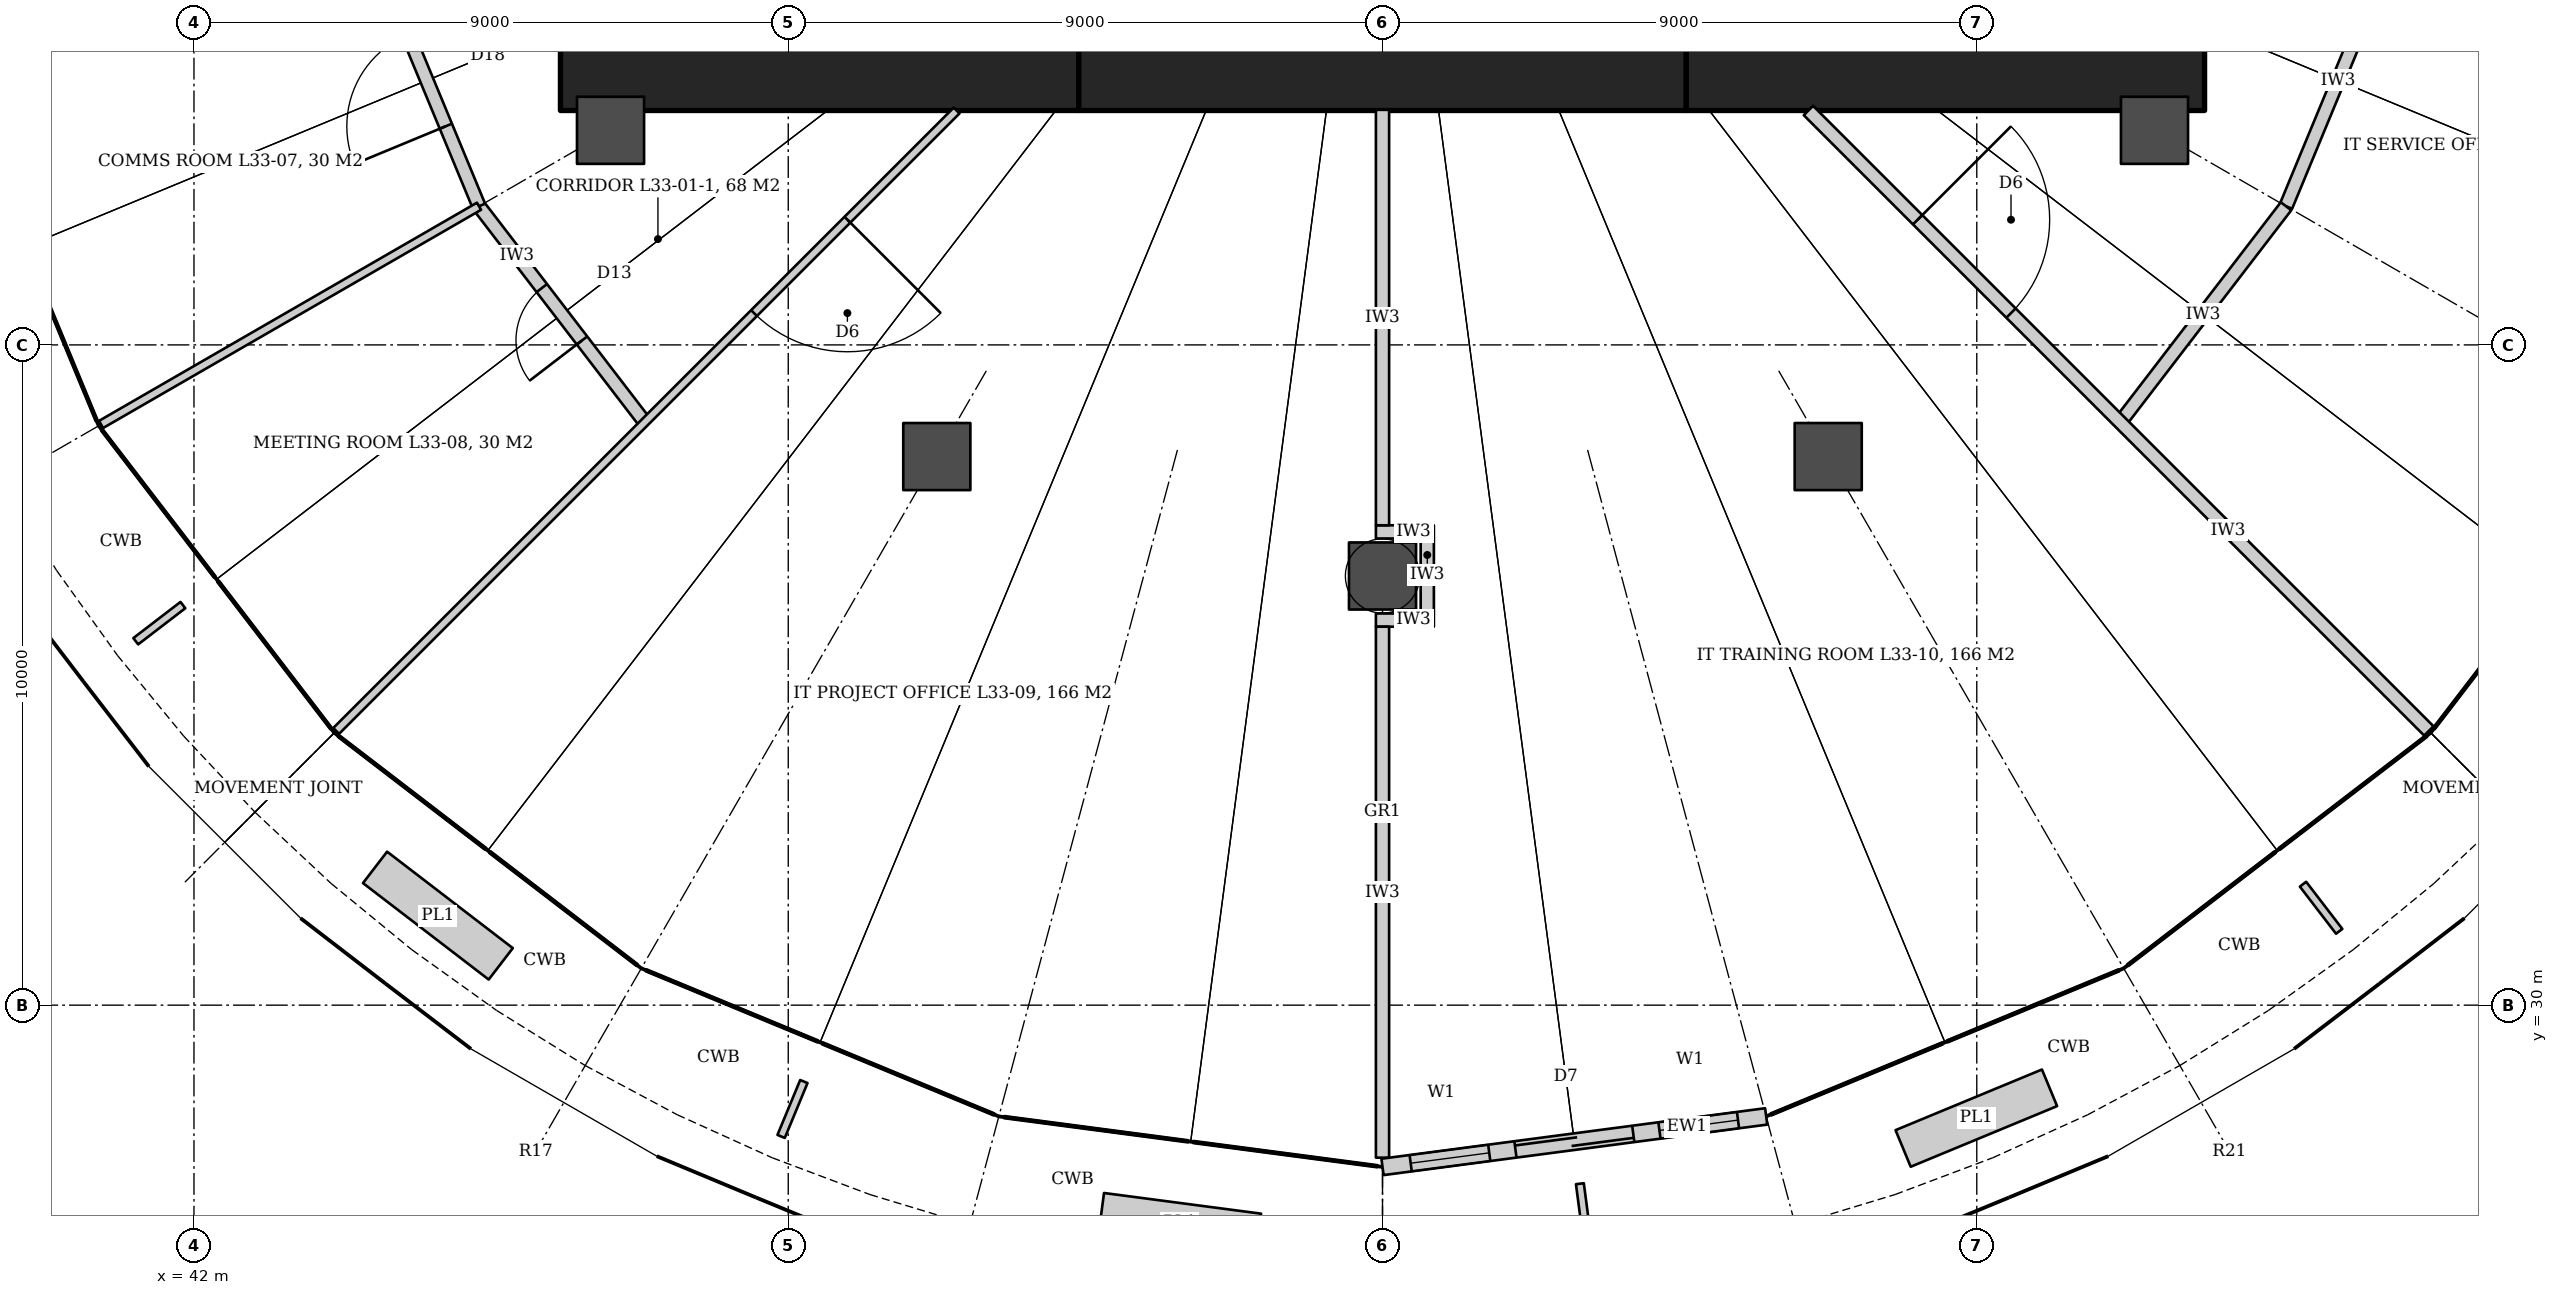
"""IFC4 building model, lengths in metres.
Left out: names, types, materials, properties, quantities, classifications, styles, units other than length and angle.
Written with IfcOpenShell. Run it as: python <this file> out.ifc"""

import sys

from ifc_helpers import new_model, si_unit, direction, frame, frame_2d, origin, origin_2d, place, context, subcontext, project, spatial, rectangle, hollow_circle, extrude, element, fill, save


model = new_model("IFC4")
c1 = context("Model", 3, precision=1e-05, world=origin(), true_north=direction((0.0, 1.0)))
c2 = subcontext(c1, "Body", "Model", "MODEL_VIEW")
j1 = project(units=[si_unit("LENGTHUNIT", "METRE"), si_unit("PLANEANGLEUNIT", "RADIAN")], contexts=[c1])
p1 = place(None, origin())
s1 = spatial("IfcSite", under=j1, at=p1, CompositionType="ELEMENT")
p2 = place(p1, origin())
s2 = spatial("IfcBuilding", under=s1, at=p2, CompositionType="ELEMENT")
p3 = place(p2, frame((0.0, 0.0, 147.8)))
s3 = spatial("IfcBuildingStorey", under=s2, at=p3, CompositionType="ELEMENT", Elevation=147.8)
p4 = place(p3, frame((47.55, 44.45, 0.0), z_axis=(0.0, 0.0, 1.0), x_axis=(1.0, 0.0, 0.0)))
e1 = element("IfcWall", 1, at=p4, inside=s3, PredefinedType="SHEAR", context=c2, shape_type="SweptSolid", body=[
    extrude(rectangle(XDim=7.85, YDim=1.8, at=frame_2d((3.925, 0.0))), origin(), (0.0, 0.0, 1.0), 4.2),
])
p5 = place(p3, frame((55.4, 44.45, 0.0), z_axis=(0.0, 0.0, 1.0), x_axis=(1.0, 0.0, 0.0)))
e2 = element("IfcWall", 2, at=p5, inside=s3, PredefinedType="SHEAR", context=c2, shape_type="SweptSolid", body=[
    extrude(rectangle(XDim=9.2, YDim=1.8, at=frame_2d((4.6, 0.0))), origin(), (0.0, 0.0, 1.0), 4.2),
])
p6 = place(p3, frame((64.6, 44.45, 0.0), z_axis=(0.0, 0.0, 1.0), x_axis=(1.0, 0.0, 0.0)))
e3 = element("IfcWall", 3, at=p6, inside=s3, PredefinedType="SHEAR", context=c2, shape_type="SweptSolid", body=[
    extrude(rectangle(XDim=7.85, YDim=1.8, at=frame_2d((3.925, 0.0))), origin(), (0.0, 0.0, 1.0), 4.2),
])
for number, where, z_axis, x_axis in (
    (4, (48.309, 43.25, 0.0), (0.0, 0.0, 1.0), (1.0, 0.0, 0.0)),
    (5, (53.25, 38.309, 0.0), (0.0, 0.0, 1.0), (1.0, 0.0, 0.0)),
    (6, (60.0, 36.5, 0.0), (0.0, 0.0, 1.0), (1.0, 0.0, 0.0)),
    (7, (66.75, 38.309, 0.0), (0.0, 0.0, 1.0), (1.0, 0.0, 0.0)),
    (8, (71.691, 43.25, 0.0), (0.0, 0.0, 1.0), (1.0, 0.0, 0.0)),
):
    element("IfcColumn", number, at=place(p3, frame(where, z_axis=z_axis, x_axis=x_axis)), inside=s3, PredefinedType="COLUMN", context=c2, shape_type="SweptSolid", body=[
        extrude(hollow_circle(Radius=0.508, WallThickness=0.05, at=origin_2d()), origin(), (0.0, 0.0, 1.0), 4.2),
    ])
p7 = place(p3, frame((48.828, 38.828, 0.0), z_axis=(0.0, 0.0, 1.0), x_axis=(-0.608714823874, 0.793389099494, 0.0)))
e9 = element("IfcWall", 9, at=p7, inside=s3, PredefinedType="PARTITIONING", context=c2, shape_type="SweptSolid", body=[
    extrude(rectangle(XDim=4.125, YDim=0.2, at=frame_2d((2.062, 0.0))), origin(), (0.0, 0.0, 1.0), 3.04),
])
p8 = place(p7, frame((1.562, 0.0, 0.0)))
e10 = element("IfcOpeningElement", 10, at=p8, cuts=e9, PredefinedType="OPENING", context=c2, shape_type="SweptSolid", body=[
    extrude(rectangle(XDim=1.0, YDim=2.4, at=frame_2d((0.5, 1.2))), frame((0.0, 0.11, 0.0), z_axis=(0.0, -1.0, 0.0), x_axis=(1.0, 0.0, 0.0)), (0.0, 0.0, 1.0), 0.22),
])
p9 = place(p3, frame((46.317, 42.1, 0.0), z_axis=(0.0, 0.0, 1.0), x_axis=(-0.382731667114, 0.923859551549, 0.0)))
e11 = element("IfcWall", 11, at=p9, inside=s3, PredefinedType="PARTITIONING", context=c2, shape_type="SweptSolid", body=[
    extrude(rectangle(XDim=4.125, YDim=0.2, at=frame_2d((2.062, 0.0))), origin(), (0.0, 0.0, 1.0), 3.04),
])
p10 = place(p9, frame((1.312, 0.0, 0.0)))
e12 = element("IfcOpeningElement", 12, at=p10, cuts=e11, PredefinedType="OPENING", context=c2, shape_type="SweptSolid", body=[
    extrude(rectangle(XDim=1.5, YDim=2.1, at=frame_2d((0.75, 1.05))), frame((0.0, 0.11, 0.0), z_axis=(0.0, -1.0, 0.0), x_axis=(1.0, 0.0, 0.0)), (0.0, 0.0, 1.0), 0.22),
])
p11 = place(p3, frame((75.262, 45.911, 0.0), z_axis=(0.0, 0.0, 1.0), x_axis=(-0.382731667114, -0.923859551549, 0.0)))
e13 = element("IfcWall", 13, at=p11, inside=s3, PredefinedType="PARTITIONING", context=c2, shape_type="SweptSolid", body=[
    extrude(rectangle(XDim=4.125, YDim=0.2, at=frame_2d((2.062, 0.0))), origin(), (0.0, 0.0, 1.0), 3.04),
])
p12 = place(p3, frame((73.683, 42.1, 0.0), z_axis=(0.0, 0.0, 1.0), x_axis=(-0.608714823874, -0.793389099494, 0.0)))
e14 = element("IfcWall", 14, at=p12, inside=s3, PredefinedType="PARTITIONING", context=c2, shape_type="SweptSolid", body=[
    extrude(rectangle(XDim=4.125, YDim=0.2, at=frame_2d((2.062, 0.0))), origin(), (0.0, 0.0, 1.0), 3.04),
])
p13 = place(p3, frame((44.738, 45.911, 0.0), z_axis=(0.0, 0.0, 1.0), x_axis=(-0.965919257384, -0.258843559344, 0.0)))
e15 = element("IfcWall", 15, at=p13, inside=s3, PredefinedType="PARTITIONING", context=c2, shape_type="SweptSolid", body=[
    extrude(rectangle(XDim=6.51, YDim=0.2, at=frame_2d((3.255, 0.0))), origin(), (0.0, 0.0, 1.0), 3.04),
])
p14 = place(p3, frame((46.317, 42.1, 0.0), z_axis=(0.0, 0.0, 1.0), x_axis=(-0.866020751647, -0.500008057651, 0.0)))
e16 = element("IfcWall", 16, at=p14, inside=s3, PredefinedType="PARTITIONING", context=c2, shape_type="SweptSolid", body=[
    extrude(rectangle(XDim=6.61, YDim=0.125, at=frame_2d((3.305, 0.0))), origin(), (0.0, 0.0, 1.0), 3.04),
])
p15 = place(p3, frame((53.55, 43.55, 0.0), z_axis=(0.0, 0.0, 1.0), x_axis=(-0.707106781187, -0.707106781187, 0.0)))
e17 = element("IfcWall", 17, at=p15, inside=s3, PredefinedType="PARTITIONING", context=c2, shape_type="SweptSolid", body=[
    extrude(rectangle(XDim=13.288, YDim=0.125, at=frame_2d((6.644, 0.0))), origin(), (0.0, 0.0, 1.0), 3.02),
])
p16 = place(p15, frame((2.339, 0.0, 0.0)))
e18 = element("IfcOpeningElement", 18, at=p16, cuts=e17, PredefinedType="OPENING", context=c2, shape_type="SweptSolid", body=[
    extrude(rectangle(XDim=2.0, YDim=2.1, at=frame_2d((1.0, 1.05))), frame((0.0, 0.073, 0.0), z_axis=(0.0, -1.0, 0.0), x_axis=(1.0, 0.0, 0.0)), (0.0, 0.0, 1.0), 0.145),
])
for number, where, z_axis, x_axis in (
    (19, (59.9, 37.168, 0.0), (0.0, 0.0, 1.0), (1.0, 0.0, 0.0)),
    (20, (59.9, 35.832, 0.0), (0.0, 0.0, 1.0), (1.0, 0.0, 0.0)),
):
    element("IfcWall", number, at=place(p3, frame(where, z_axis=z_axis, x_axis=x_axis)), inside=s3, PredefinedType="PARTITIONING", context=c2, shape_type="SweptSolid", body=[
        extrude(rectangle(XDim=0.878, YDim=0.2, at=frame_2d((0.439, 0.0))), origin(), (0.0, 0.0, 1.0), 3.02),
    ])
p17 = place(p3, frame((60.678, 37.068, 0.0), z_axis=(0.0, 0.0, 1.0), x_axis=(0.0, -1.0, 0.0)))
e21 = element("IfcWall", 21, at=p17, inside=s3, PredefinedType="PARTITIONING", context=c2, shape_type="SweptSolid", body=[
    extrude(rectangle(XDim=1.136, YDim=0.2, at=frame_2d((0.568, 0.0))), origin(), (0.0, 0.0, 1.0), 3.02),
])
p18 = place(p3, frame((60.0, 43.56, 0.0), z_axis=(0.0, 0.0, 1.0), x_axis=(0.0, -1.0, 0.0)))
e22 = element("IfcWall", 22, at=p18, inside=s3, PredefinedType="PARTITIONING", context=c2, shape_type="SweptSolid", body=[
    extrude(rectangle(XDim=6.292, YDim=0.2, at=frame_2d((3.146, 0.0))), origin(), (0.0, 0.0, 1.0), 3.04),
])
p19 = place(p3, frame((60.0, 35.732, 0.0), z_axis=(0.0, 0.0, 1.0), x_axis=(0.0, -1.0, 0.0)))
e23 = element("IfcWall", 23, at=p19, inside=s3, PredefinedType="PARTITIONING", context=c2, shape_type="SweptSolid", body=[
    extrude(rectangle(XDim=8.042, YDim=0.2, at=frame_2d((4.021, 0.0))), origin(), (0.0, 0.0, 1.0), 3.04),
])
p20 = place(p3, frame((66.45, 43.55, 0.0), z_axis=(0.0, 0.0, 1.0), x_axis=(0.707106781187, -0.707106781187, 0.0)))
e24 = element("IfcWall", 24, at=p20, inside=s3, PredefinedType="PARTITIONING", context=c2, shape_type="SweptSolid", body=[
    extrude(rectangle(XDim=13.288, YDim=0.2, at=frame_2d((6.644, 0.0))), origin(), (0.0, 0.0, 1.0), 3.02),
])
p21 = place(p20, frame((2.339, 0.0, 0.0)))
e25 = element("IfcOpeningElement", 25, at=p21, cuts=e24, PredefinedType="OPENING", context=c2, shape_type="SweptSolid", body=[
    extrude(rectangle(XDim=2.0, YDim=2.1, at=frame_2d((1.0, 1.05))), frame((0.0, 0.11, 0.0), z_axis=(0.0, -1.0, 0.0), x_axis=(1.0, 0.0, 0.0)), (0.0, 0.0, 1.0), 0.22),
])
p22 = place(p3, frame((60.0, 27.55, 0.0), z_axis=(0.0, 0.0, 1.0), x_axis=(0.991446637263, 0.130512702292, 0.0)))
e26 = element("IfcWall", 26, at=p22, inside=s3, PredefinedType="SOLIDWALL", context=c2, shape_type="SweptSolid", body=[
    extrude(rectangle(XDim=5.861, YDim=0.25, at=frame_2d((2.93, 0.0))), origin(), (0.0, 0.0, 1.0), 4.04),
])
p23 = place(p22, frame((2.03, 0.0, 0.0)))
e27 = element("IfcOpeningElement", 27, at=p23, cuts=e26, PredefinedType="OPENING", context=c2, shape_type="SweptSolid", body=[
    extrude(rectangle(XDim=1.8, YDim=2.4, at=frame_2d((0.9, 1.2))), frame((0.0, 0.135, 0.0), z_axis=(0.0, -1.0, 0.0), x_axis=(1.0, 0.0, 0.0)), (0.0, 0.0, 1.0), 0.27),
])
p24 = place(p22, frame((0.43, 0.0, 0.0)))
e28 = element("IfcOpeningElement", 28, at=p24, cuts=e26, PredefinedType="OPENING", context=c2, shape_type="SweptSolid", body=[
    extrude(rectangle(XDim=1.2, YDim=2.4, at=frame_2d((0.6, 1.2))), frame((0.0, 0.135, 0.0), z_axis=(0.0, -1.0, 0.0), x_axis=(1.0, 0.0, 0.0)), (0.0, 0.0, 1.0), 0.27),
])
p25 = place(p22, frame((4.23, 0.0, 0.0)))
e29 = element("IfcOpeningElement", 29, at=p25, cuts=e26, PredefinedType="OPENING", context=c2, shape_type="SweptSolid", body=[
    extrude(rectangle(XDim=1.2, YDim=2.4, at=frame_2d((0.6, 1.2))), frame((0.0, 0.135, 0.0), z_axis=(0.0, -1.0, 0.0), x_axis=(1.0, 0.0, 0.0)), (0.0, 0.0, 1.0), 0.27),
])
p26 = place(p10, origin())
e30 = element("IfcDoor", 30, at=p26, inside=s3, OperationType="DOUBLE_DOOR_DOUBLE_SWING", PredefinedType="DOOR", context=c2, shape_type="SweptSolid", body=[
    extrude(rectangle(XDim=1.5, YDim=2.1, at=frame_2d((0.75, 1.05))), frame((0.0, 0.025, 0.0), z_axis=(0.0, -1.0, 0.0), x_axis=(1.0, 0.0, 0.0)), (0.0, 0.0, 1.0), 0.05),
])
fill(e12, e30)
p27 = place(p8, origin())
e31 = element("IfcDoor", 31, at=p27, inside=s3, OperationType="SINGLE_SWING_LEFT", PredefinedType="DOOR", context=c2, shape_type="SweptSolid", body=[
    extrude(rectangle(XDim=1.0, YDim=2.4, at=frame_2d((0.5, 1.2))), frame((0.0, 0.025, 0.0), z_axis=(0.0, -1.0, 0.0), x_axis=(1.0, 0.0, 0.0)), (0.0, 0.0, 1.0), 0.05),
])
fill(e10, e31)
p28 = place(p16, origin())
e32 = element("IfcDoor", 32, at=p28, inside=s3, OperationType="DOUBLE_DOOR_DOUBLE_SWING", PredefinedType="DOOR", context=c2, shape_type="SweptSolid", body=[
    extrude(rectangle(XDim=2.0, YDim=2.1, at=frame_2d((1.0, 1.05))), frame((0.0, 0.025, 0.0), z_axis=(0.0, -1.0, 0.0), x_axis=(1.0, 0.0, 0.0)), (0.0, 0.0, 1.0), 0.05),
])
fill(e18, e32)
p29 = place(p21, origin())
e33 = element("IfcDoor", 33, at=p29, inside=s3, OperationType="DOUBLE_DOOR_DOUBLE_SWING", PredefinedType="DOOR", context=c2, shape_type="SweptSolid", body=[
    extrude(rectangle(XDim=2.0, YDim=2.1, at=frame_2d((1.0, 1.05))), frame((0.0, 0.025, 0.0), z_axis=(0.0, -1.0, 0.0), x_axis=(1.0, 0.0, 0.0)), (0.0, 0.0, 1.0), 0.05),
])
fill(e25, e33)
p30 = place(p23, origin())
e34 = element("IfcDoor", 34, at=p30, inside=s3, OperationType="DOUBLE_DOOR_SLIDING", PredefinedType="DOOR", context=c2, shape_type="SweptSolid", body=[
    extrude(rectangle(XDim=1.8, YDim=2.4, at=frame_2d((0.9, 1.2))), frame((0.0, 0.025, 0.0), z_axis=(0.0, -1.0, 0.0), x_axis=(1.0, 0.0, 0.0)), (0.0, 0.0, 1.0), 0.05),
])
fill(e27, e34)
p31 = place(p24, origin())
e35 = element("IfcWindow", 35, at=p31, inside=s3, PartitioningType="SINGLE_PANEL", PredefinedType="WINDOW", context=c2, shape_type="SweptSolid", body=[
    extrude(rectangle(XDim=1.2, YDim=2.4, at=frame_2d((0.6, 1.2))), frame((0.0, 0.03, 0.0), z_axis=(0.0, -1.0, 0.0), x_axis=(1.0, 0.0, 0.0)), (0.0, 0.0, 1.0), 0.06),
])
fill(e28, e35)
p32 = place(p25, origin())
e36 = element("IfcWindow", 36, at=p32, inside=s3, PartitioningType="SINGLE_PANEL", PredefinedType="WINDOW", context=c2, shape_type="SweptSolid", body=[
    extrude(rectangle(XDim=1.2, YDim=2.4, at=frame_2d((0.6, 1.2))), frame((0.0, 0.03, 0.0), z_axis=(0.0, -1.0, 0.0), x_axis=(1.0, 0.0, 0.0)), (0.0, 0.0, 1.0), 0.06),
])
fill(e29, e36)
save(model, sys.argv[1])
